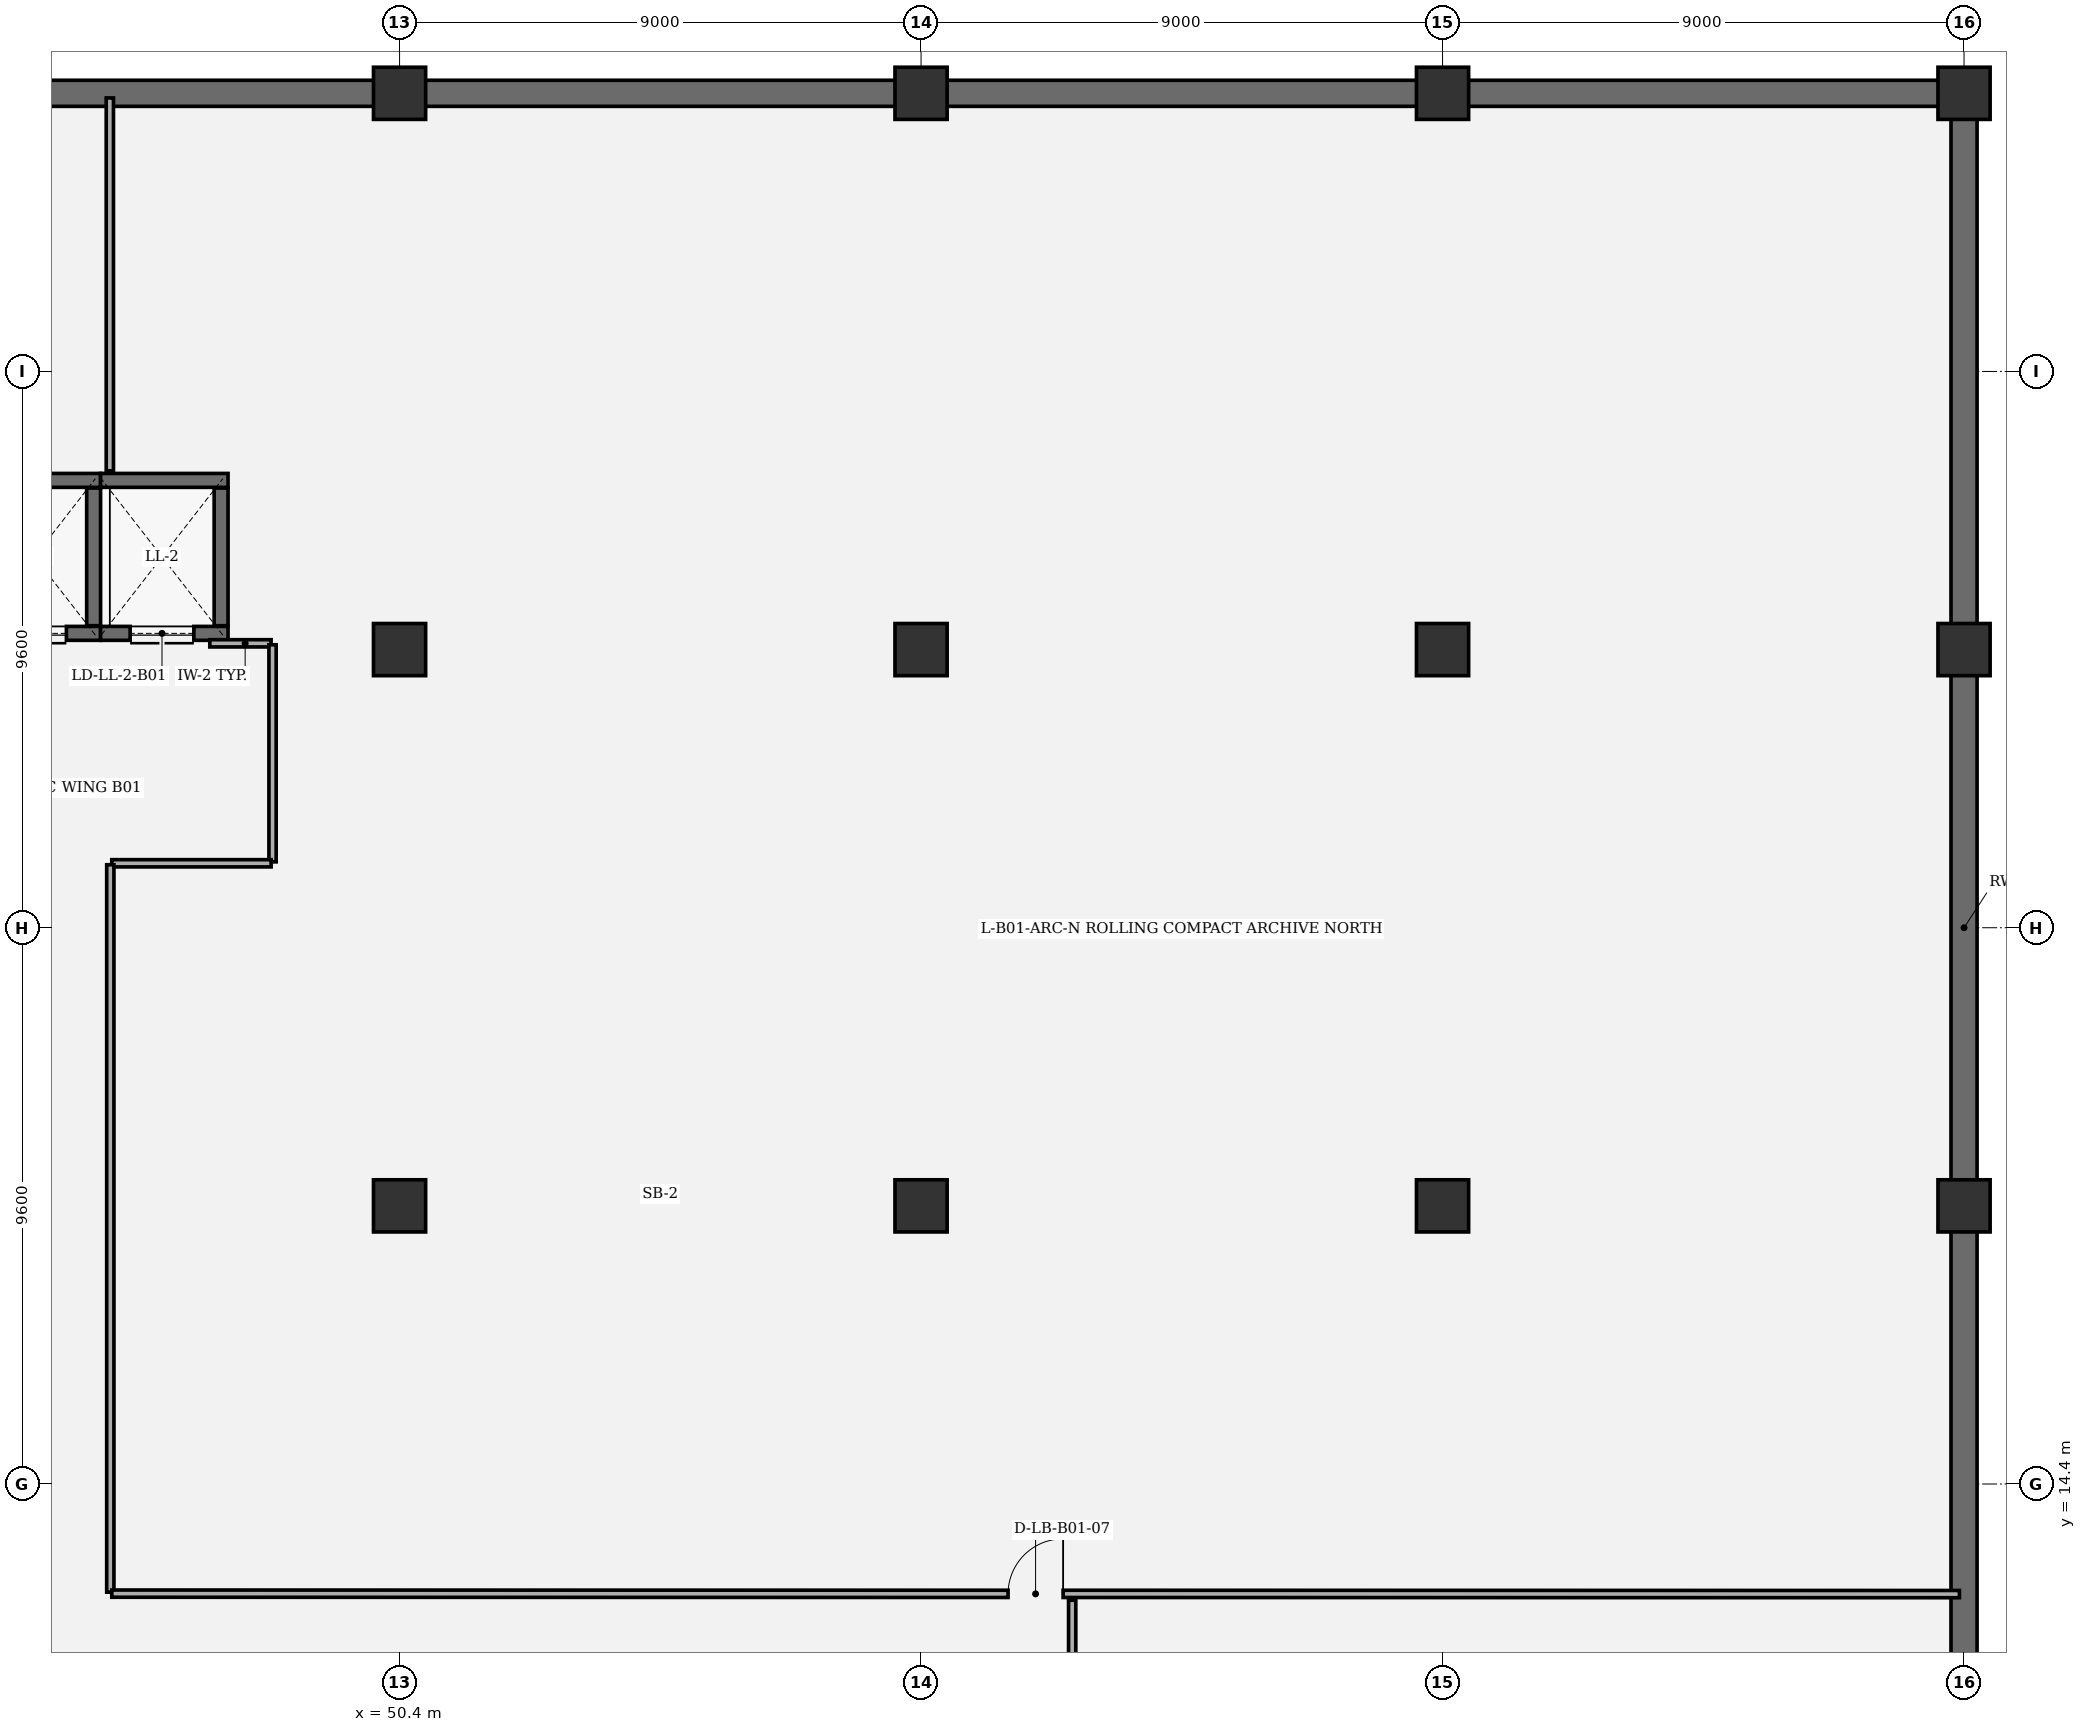
"""IFC4 building model, lengths in metres.
Left out: names, types, materials, properties, quantities, classifications, styles, units other than length and angle.
Written with IfcOpenShell. Run it as: python <this file> out.ifc"""

import sys

from ifc_helpers import new_model, si_unit, direction, frame, frame_2d, origin, origin_2d, place, context, subcontext, project, spatial, rectangle, extrude, element, fill, save


model = new_model("IFC4")
c1 = context("Model", 3, precision=1e-05, world=origin(), true_north=direction((0.0, 1.0)))
c2 = subcontext(c1, "Body", "Model", "MODEL_VIEW")
j1 = project(units=[si_unit("LENGTHUNIT", "METRE"), si_unit("PLANEANGLEUNIT", "RADIAN")], contexts=[c1])
p1 = place(None, origin())
s1 = spatial("IfcSite", under=j1, at=p1, CompositionType="ELEMENT")
p2 = place(p1, origin())
s2 = spatial("IfcBuilding", under=s1, at=p2, CompositionType="ELEMENT")
p3 = place(p2, frame((0.0, 0.0, -5.4)))
s3 = spatial("IfcBuildingStorey", under=s2, at=p3, CompositionType="ELEMENT", Elevation=-5.4)
p4 = place(p3, frame((77.4, -38.16, 0.0), z_axis=(0.0, 0.0, 1.0), x_axis=(0.0, 1.0, 0.0)))
e1 = element("IfcWall", 1, at=p4, inside=s3, PredefinedType="USERDEFINED", context=c2, shape_type="SweptSolid", body=[
    extrude(rectangle(XDim=76.32, YDim=0.45, at=frame_2d((38.16, 0.0))), origin(), (0.0, 0.0, 1.0), 4.35),
])
p5 = place(p3, frame((77.4, 38.4, 0.0), z_axis=(0.0, 0.0, 1.0), x_axis=(-1.0, 0.0, 0.0)))
e2 = element("IfcWall", 2, at=p5, inside=s3, PredefinedType="USERDEFINED", context=c2, shape_type="SweptSolid", body=[
    extrude(rectangle(XDim=45.0, YDim=0.45, at=frame_2d((22.5, 0.0))), origin(), (0.0, 0.0, 1.0), 4.35),
])
for number, where, z_axis, x_axis in (
    (3, (50.4, 19.2, 0.0), (0.0, 0.0, 1.0), (1.0, 0.0, 0.0)),
    (4, (50.4, 28.8, 0.0), (0.0, 0.0, 1.0), (1.0, 0.0, 0.0)),
    (5, (50.4, 38.4, 0.0), (0.0, 0.0, 1.0), (1.0, 0.0, 0.0)),
    (6, (59.4, 19.2, 0.0), (0.0, 0.0, 1.0), (1.0, 0.0, 0.0)),
    (7, (59.4, 28.8, 0.0), (0.0, 0.0, 1.0), (1.0, 0.0, 0.0)),
    (8, (59.4, 38.4, 0.0), (0.0, 0.0, 1.0), (1.0, 0.0, 0.0)),
    (9, (68.4, 19.2, 0.0), (0.0, 0.0, 1.0), (1.0, 0.0, 0.0)),
    (10, (68.4, 28.8, 0.0), (0.0, 0.0, 1.0), (1.0, 0.0, 0.0)),
    (11, (68.4, 38.4, 0.0), (0.0, 0.0, 1.0), (1.0, 0.0, 0.0)),
    (12, (77.4, 19.2, 0.0), (0.0, 0.0, 1.0), (1.0, 0.0, 0.0)),
    (13, (77.4, 28.8, 0.0), (0.0, 0.0, 1.0), (1.0, 0.0, 0.0)),
    (14, (77.4, 38.4, 0.0), (0.0, 0.0, 1.0), (1.0, 0.0, 0.0)),
):
    element("IfcColumn", number, at=place(p3, frame(where, z_axis=z_axis, x_axis=x_axis)), inside=s3, PredefinedType="COLUMN", context=c2, shape_type="SweptSolid", body=[
        extrude(rectangle(XDim=0.9, YDim=0.9, at=origin_2d()), origin(), (0.0, 0.0, 1.0), 5.4),
    ])
p6 = place(p3, frame((45.24, 29.08, 0.0), z_axis=(0.0, 0.0, 1.0), x_axis=(-1.0, 0.0, 0.0)))
e15 = element("IfcWall", 15, at=p6, inside=s3, PredefinedType="SHEAR", context=c2, shape_type="SweptSolid", body=[
    extrude(rectangle(XDim=2.28, YDim=0.24, at=frame_2d((1.14, 0.0))), origin(), (0.0, 0.0, 1.0), 5.1),
])
p7 = place(p6, frame((0.59, 0.0, 0.0)))
e16 = element("IfcOpeningElement", 16, at=p7, cuts=e15, PredefinedType="OPENING", context=c2, shape_type="SweptSolid", body=[
    extrude(rectangle(XDim=1.1, YDim=2.2, at=frame_2d((0.55, 1.1))), frame((0.0, 0.13, 0.0), z_axis=(0.0, -1.0, 0.0), x_axis=(1.0, 0.0, 0.0)), (0.0, 0.0, 1.0), 0.26),
])
p8 = place(p3, frame((42.96, 31.72, 0.0), z_axis=(0.0, 0.0, 1.0), x_axis=(1.0, 0.0, 0.0)))
e17 = element("IfcWall", 17, at=p8, inside=s3, PredefinedType="SHEAR", context=c2, shape_type="SweptSolid", body=[
    extrude(rectangle(XDim=2.28, YDim=0.24, at=frame_2d((1.14, 0.0))), origin(), (0.0, 0.0, 1.0), 5.1),
])
p9 = place(p3, frame((45.12, 31.588, 0.0), z_axis=(0.0, 0.0, 1.0), x_axis=(0.0, -1.0, 0.0)))
e18 = element("IfcWall", 18, at=p9, inside=s3, PredefinedType="SHEAR", context=c2, shape_type="SweptSolid", body=[
    extrude(rectangle(XDim=2.376, YDim=0.24, at=frame_2d((1.188, 0.0))), origin(), (0.0, 0.0, 1.0), 5.1),
])
p10 = place(p3, frame((47.44, 29.08, 0.0), z_axis=(0.0, 0.0, 1.0), x_axis=(-1.0, 0.0, 0.0)))
e19 = element("IfcWall", 19, at=p10, inside=s3, PredefinedType="SHEAR", context=c2, shape_type="SweptSolid", body=[
    extrude(rectangle(XDim=2.2, YDim=0.24, at=frame_2d((1.1, 0.0))), origin(), (0.0, 0.0, 1.0), 5.1),
])
p11 = place(p10, frame((0.59, 0.0, 0.0)))
e20 = element("IfcOpeningElement", 20, at=p11, cuts=e19, PredefinedType="OPENING", context=c2, shape_type="SweptSolid", body=[
    extrude(rectangle(XDim=1.1, YDim=2.2, at=frame_2d((0.55, 1.1))), frame((0.0, 0.13, 0.0), z_axis=(0.0, -1.0, 0.0), x_axis=(1.0, 0.0, 0.0)), (0.0, 0.0, 1.0), 0.26),
])
p12 = place(p3, frame((45.24, 31.72, 0.0), z_axis=(0.0, 0.0, 1.0), x_axis=(1.0, 0.0, 0.0)))
e21 = element("IfcWall", 21, at=p12, inside=s3, PredefinedType="SHEAR", context=c2, shape_type="SweptSolid", body=[
    extrude(rectangle(XDim=2.2, YDim=0.24, at=frame_2d((1.1, 0.0))), origin(), (0.0, 0.0, 1.0), 5.1),
])
p13 = place(p3, frame((47.32, 31.588, 0.0), z_axis=(0.0, 0.0, 1.0), x_axis=(0.0, -1.0, 0.0)))
e22 = element("IfcWall", 22, at=p13, inside=s3, PredefinedType="SHEAR", context=c2, shape_type="SweptSolid", body=[
    extrude(rectangle(XDim=2.376, YDim=0.24, at=frame_2d((1.188, 0.0))), origin(), (0.0, 0.0, 1.0), 5.1),
])
p14 = place(p3, frame((48.183, 28.908, 0.0), z_axis=(0.0, 0.0, 1.0), x_axis=(-1.0, 0.0, 0.0)))
e23 = element("IfcWall", 23, at=p14, inside=s3, PredefinedType="PARTITIONING", context=c2, shape_type="SweptSolid", body=[
    extrude(rectangle(XDim=1.058, YDim=0.125, at=frame_2d((0.529, 0.0))), origin(), (0.0, 0.0, 1.0), 4.374),
])
p15 = place(p3, frame((48.208, 28.883, 0.0), z_axis=(0.0, 0.0, 1.0), x_axis=(0.0, -1.0, 0.0)))
e24 = element("IfcWall", 24, at=p15, inside=s3, PredefinedType="PARTITIONING", context=c2, shape_type="SweptSolid", body=[
    extrude(rectangle(XDim=3.746, YDim=0.125, at=frame_2d((1.873, 0.0))), origin(), (0.0, 0.0, 1.0), 5.1),
])
p16 = place(p3, frame((45.433, 25.112, 0.0), z_axis=(0.0, 0.0, 1.0), x_axis=(1.0, 0.0, 0.0)))
e25 = element("IfcWall", 25, at=p16, inside=s3, PredefinedType="PARTITIONING", context=c2, shape_type="SweptSolid", body=[
    extrude(rectangle(XDim=2.75, YDim=0.125, at=frame_2d((1.375, 0.0))), origin(), (0.0, 0.0, 1.0), 5.1),
])
p17 = place(p3, frame((45.408, 25.087, 0.0), z_axis=(0.0, 0.0, 1.0), x_axis=(0.0, -1.0, 0.0)))
e26 = element("IfcWall", 26, at=p17, inside=s3, PredefinedType="PARTITIONING", context=c2, shape_type="SweptSolid", body=[
    extrude(rectangle(XDim=12.554, YDim=0.125, at=frame_2d((6.277, 0.0))), origin(), (0.0, 0.0, 1.0), 5.1),
])
p18 = place(p3, frame((45.433, 12.508, 0.0), z_axis=(0.0, 0.0, 1.0), x_axis=(0.999999968081, -0.000252662519, 0.0)))
e27 = element("IfcWall", 27, at=p18, inside=s3, PredefinedType="PARTITIONING", context=c2, shape_type="SweptSolid", body=[
    extrude(rectangle(XDim=31.887, YDim=0.125, at=frame_2d((15.943, 0.0))), origin(), (0.0, 0.0, 1.0), 5.1),
])
p19 = place(p18, frame((15.469, 0.0, 0.0)))
e28 = element("IfcOpeningElement", 28, at=p19, cuts=e27, PredefinedType="OPENING", context=c2, shape_type="SweptSolid", body=[
    extrude(rectangle(XDim=0.95, YDim=2.15, at=frame_2d((0.475, 1.075))), frame((0.0, 0.073, 0.0), z_axis=(0.0, -1.0, 0.0), x_axis=(1.0, 0.0, 0.0)), (0.0, 0.0, 1.0), 0.145),
])
p20 = place(p3, frame((45.4, 38.32, 0.0), z_axis=(0.0, 0.0, 1.0), x_axis=(0.0, -1.0, 0.0)))
e29 = element("IfcWall", 29, at=p20, inside=s3, PredefinedType="PARTITIONING", context=c2, shape_type="SweptSolid", body=[
    extrude(rectangle(XDim=6.435, YDim=0.125, at=frame_2d((3.218, 0.0))), origin(), (0.0, 0.0, 1.0), 5.1),
])
p21 = place(p3, frame((62.008, 12.394, 0.0), z_axis=(0.0, 0.0, 1.0), x_axis=(0.0, -1.0, 0.0)))
e30 = element("IfcWall", 30, at=p21, inside=s3, PredefinedType="PARTITIONING", context=c2, shape_type="SweptSolid", body=[
    extrude(rectangle(XDim=3.177, YDim=0.125, at=frame_2d((1.588, 0.0))), origin(), (0.0, 0.0, 1.0), 5.1),
])
p22 = place(p7, origin())
e31 = element("IfcDoor", 31, at=p22, inside=s3, OperationType="DOUBLE_DOOR_SLIDING", PredefinedType="DOOR", context=c2, shape_type="SweptSolid", body=[
    extrude(rectangle(XDim=1.1, YDim=2.2, at=frame_2d((0.55, 1.1))), frame((0.0, 0.025, 0.0), z_axis=(0.0, -1.0, 0.0), x_axis=(1.0, 0.0, 0.0)), (0.0, 0.0, 1.0), 0.05),
])
fill(e16, e31)
p23 = place(p11, origin())
e32 = element("IfcDoor", 32, at=p23, inside=s3, OperationType="DOUBLE_DOOR_SLIDING", PredefinedType="DOOR", context=c2, shape_type="SweptSolid", body=[
    extrude(rectangle(XDim=1.1, YDim=2.2, at=frame_2d((0.55, 1.1))), frame((0.0, 0.025, 0.0), z_axis=(0.0, -1.0, 0.0), x_axis=(1.0, 0.0, 0.0)), (0.0, 0.0, 1.0), 0.05),
])
fill(e20, e32)
p24 = place(p19, origin())
e33 = element("IfcDoor", 33, at=p24, inside=s3, OperationType="SINGLE_SWING_RIGHT", PredefinedType="DOOR", context=c2, shape_type="SweptSolid", body=[
    extrude(rectangle(XDim=0.95, YDim=2.15, at=frame_2d((0.475, 1.075))), frame((0.0, 0.025, 0.0), z_axis=(0.0, -1.0, 0.0), x_axis=(1.0, 0.0, 0.0)), (0.0, 0.0, 1.0), 0.05),
])
fill(e28, e33)
save(model, sys.argv[1])
